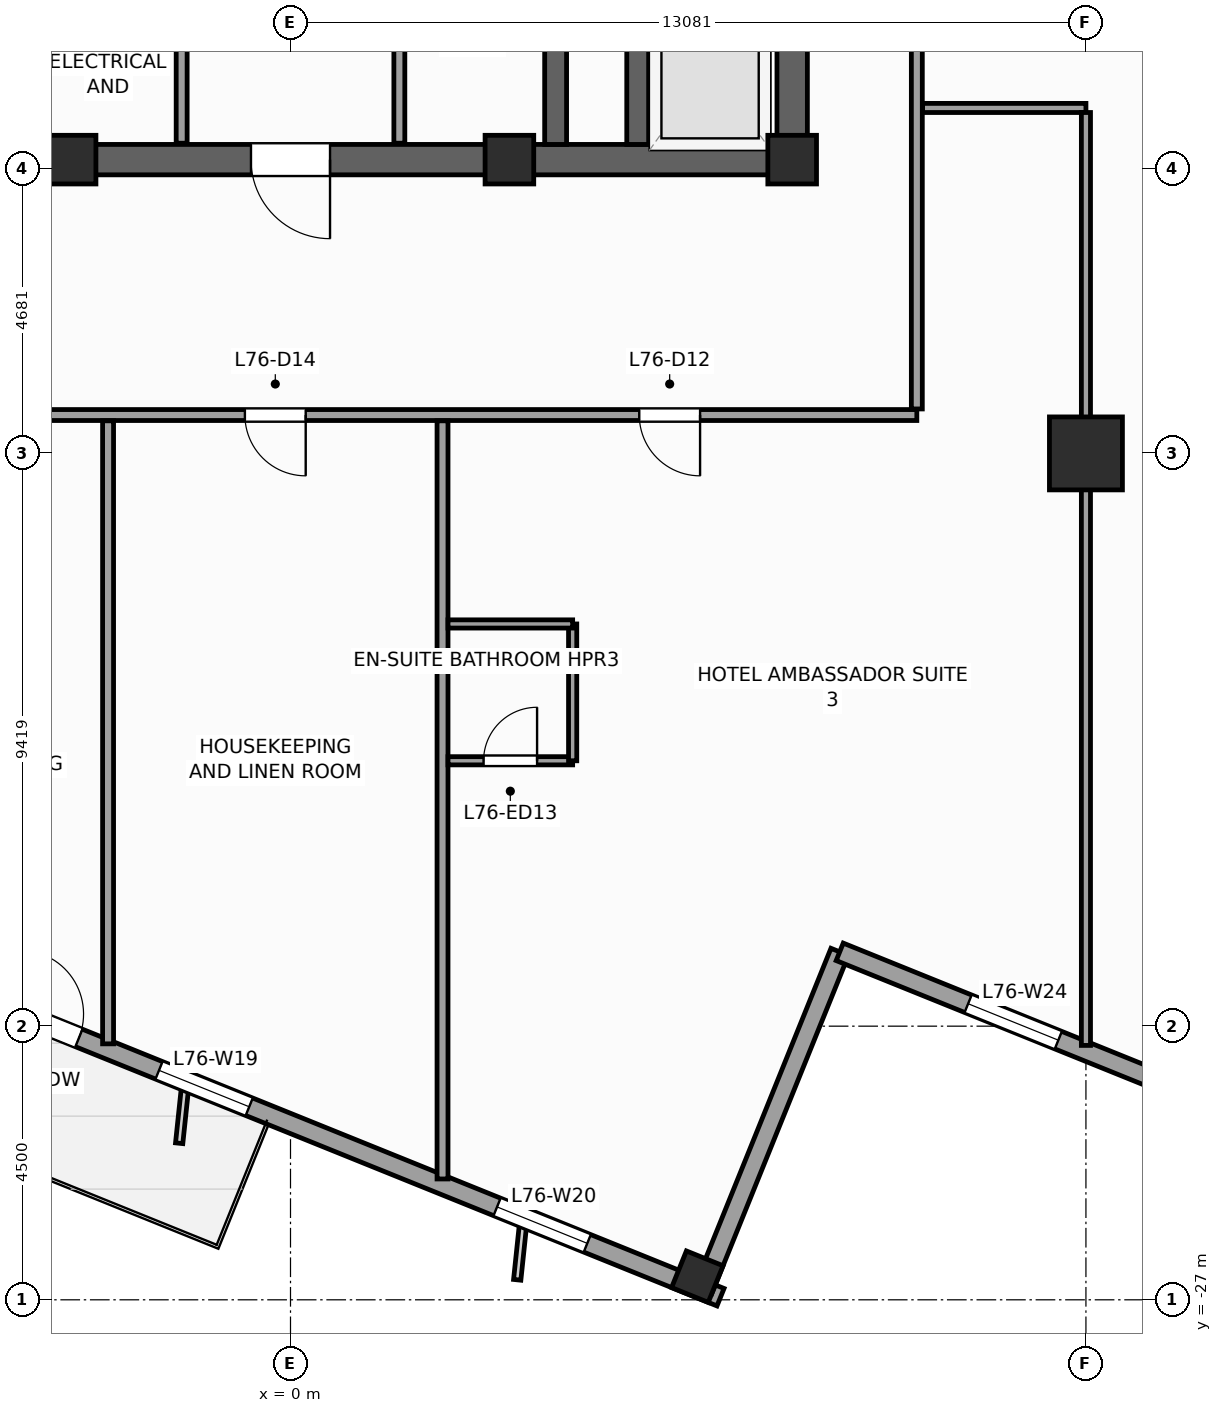
"""IFC4 building model, lengths in metres.
Left out: names, types, materials, properties, quantities, classifications, styles, units other than length and angle.
Written with IfcOpenShell. Run it as: python <this file> out.ifc"""

import sys

from ifc_helpers import new_model, si_unit, direction, frame, frame_2d, origin, origin_2d, place, context, subcontext, project, spatial, rectangle, extrude, source, transform, mapped, element, fill, save


model = new_model("IFC4")
c1 = context("Model", 3, precision=1e-05, world=origin(), true_north=direction((0.0, 1.0)))
c2 = subcontext(c1, "Body", "Model", "MODEL_VIEW")
j1 = project(units=[si_unit("LENGTHUNIT", "METRE"), si_unit("PLANEANGLEUNIT", "RADIAN")], contexts=[c1])
p1 = place(None, origin())
s1 = spatial("IfcSite", under=j1, at=p1, CompositionType="ELEMENT")
p2 = place(p1, origin())
s2 = spatial("IfcBuilding", under=s1, at=p2, CompositionType="ELEMENT")
p3 = place(p2, frame((0.0, 0.0, 308.4)))
s3 = spatial("IfcBuildingStorey", under=s2, at=p3, CompositionType="ELEMENT", Elevation=308.4)
p4 = place(p3, frame((-8.5, -8.25, 0.0), z_axis=(0.0, 0.0, 1.0), x_axis=(1.0, 0.0, 0.0)))
e1 = element("IfcWall", 1, at=p4, inside=s3, PredefinedType="SHEAR", context=c2, shape_type="SweptSolid", body=[
    extrude(rectangle(XDim=17.0, YDim=0.5, at=frame_2d((8.5, 0.0))), origin(), (0.0, 0.0, 1.0), 3.6),
])
p5 = place(p4, frame((7.85, 0.0, 0.0)))
e2 = element("IfcOpeningElement", 2, at=p5, cuts=e1, PredefinedType="OPENING", context=c2, shape_type="SweptSolid", body=[
    extrude(rectangle(XDim=1.3, YDim=2.2, at=frame_2d((0.65, 1.1))), frame((0.0, 0.26, 0.0), z_axis=(0.0, -1.0, 0.0), x_axis=(1.0, 0.0, 0.0)), (0.0, 0.0, 1.0), 0.52),
])
p6 = place(p3, frame((8.25, -8.0, 0.0), z_axis=(0.0, 0.0, 1.0), x_axis=(0.0, 1.0, 0.0)))
e3 = element("IfcWall", 3, at=p6, inside=s3, PredefinedType="SHEAR", context=c2, shape_type="SweptSolid", body=[
    extrude(rectangle(XDim=16.0, YDim=0.5, at=frame_2d((8.0, 0.0))), origin(), (0.0, 0.0, 1.0), 3.6),
])
p7 = place(p6, frame((4.69, 0.0, 0.0)))
e4 = element("IfcOpeningElement", 4, at=p7, cuts=e3, PredefinedType="OPENING", context=c2, shape_type="SweptSolid", body=[
    extrude(rectangle(XDim=1.3, YDim=2.2, at=frame_2d((0.65, 1.1))), frame((0.0, 0.26, 0.0), z_axis=(0.0, -1.0, 0.0), x_axis=(1.0, 0.0, 0.0)), (0.0, 0.0, 1.0), 0.52),
])
p8 = place(p3, frame((4.36, -8.0, 0.0), z_axis=(0.0, 0.0, 1.0), x_axis=(0.0, 1.0, 0.0)))
e5 = element("IfcWall", 5, at=p8, inside=s3, PredefinedType="SHEAR", context=c2, shape_type="SweptSolid", body=[
    extrude(rectangle(XDim=16.0, YDim=0.36, at=frame_2d((8.0, 0.0))), origin(), (0.0, 0.0, 1.0), 3.6),
])
p9 = place(p3, frame((5.71, -8.0, 0.0), z_axis=(0.0, 0.0, 1.0), x_axis=(0.0, 1.0, 0.0)))
e6 = element("IfcWall", 6, at=p9, inside=s3, PredefinedType="SHEAR", context=c2, shape_type="SweptSolid", body=[
    extrude(rectangle(XDim=2.54, YDim=0.36, at=frame_2d((1.27, 0.0))), origin(), (0.0, 0.0, 1.0), 3.6),
])
m1 = source(origin(), c2, "Body", "SweptSolid", [
    extrude(rectangle(XDim=0.8, YDim=0.8, at=origin_2d()), origin(), (0.0, 0.0, 1.0), 3.6),
])
for number, where, z_axis, x_axis in (
    (7, (8.25, -8.25, 0.0), (0.0, 0.0, 1.0), (1.0, 0.0, 0.0)),
    (8, (-3.6, -8.25, 0.0), (0.0, 0.0, 1.0), (1.0, 0.0, 0.0)),
    (9, (3.6, -8.25, 0.0), (0.0, 0.0, 1.0), (1.0, 0.0, 0.0)),
):
    element("IfcColumn", number, at=place(p3, frame(where, z_axis=z_axis, x_axis=x_axis)), inside=s3, PredefinedType="PILASTER", context=c2, shape_type="MappedRepresentation", body=[
        mapped(m1, transform((0.0, 0.0, 0.0), scale=1.0)),
    ])
m2 = source(origin(), c2, "Body", "SweptSolid", [
    extrude(rectangle(XDim=1.2, YDim=1.2, at=origin_2d()), origin(), (0.0, 0.0, 1.0), 3.6),
])
p10 = place(p3, frame((13.081, -13.081, 0.0), z_axis=(0.0, 0.0, 1.0), x_axis=(1.0, 0.0, 0.0)))
e10 = element("IfcColumn", 10, at=p10, inside=s3, PredefinedType="COLUMN", context=c2, shape_type="MappedRepresentation", body=[
    mapped(m2, transform((0.0, 0.0, 0.0), scale=1.0)),
])
m3 = source(origin(), c2, "Body", "SweptSolid", [
    extrude(rectangle(XDim=0.65, YDim=0.65, at=origin_2d()), origin(), (0.0, 0.0, 1.0), 3.6),
])
p11 = place(p3, frame((6.69, -26.62, 0.0), z_axis=(0.0, 0.0, 1.0), x_axis=(0.374606593416, 0.927183854567, 0.0)))
e11 = element("IfcColumn", 11, at=p11, inside=s3, PredefinedType="COLUMN", context=c2, shape_type="MappedRepresentation", body=[
    mapped(m3, transform((0.0, 0.0, 0.0), scale=1.0)),
])
p12 = place(p3, frame((-23.813, -14.479, 0.0), z_axis=(0.0, 0.0, 1.0), x_axis=(0.927182657188, -0.374609557019, 0.0)))
e12 = element("IfcWall", 12, at=p12, inside=s3, PredefinedType="STANDARD", context=c2, shape_type="SweptSolid", body=[
    extrude(rectangle(XDim=33.31, YDim=0.31, at=frame_2d((16.655, 0.0))), origin(), (0.0, 0.0, 1.0), 2.75),
])
p13 = place(p12, frame((20.88, 0.0, 0.0)))
e13 = element("IfcOpeningElement", 13, at=p13, cuts=e12, PredefinedType="OPENING", context=c2, shape_type="SweptSolid", body=[
    extrude(rectangle(XDim=1.05, YDim=2.25, at=frame_2d((0.525, 1.125))), frame((0.0, 0.165, 0.0), z_axis=(0.0, -1.0, 0.0), x_axis=(1.0, 0.0, 0.0)), (0.0, 0.0, 1.0), 0.33),
])
p14 = place(p12, frame((3.197, 0.0, 0.47)))
e14 = element("IfcOpeningElement", 14, at=p14, cuts=e12, PredefinedType="OPENING", context=c2, shape_type="SweptSolid", body=[
    extrude(rectangle(XDim=1.6, YDim=2.1, at=frame_2d((0.8, 1.05))), frame((0.0, 0.165, 0.0), z_axis=(0.0, -1.0, 0.0), x_axis=(1.0, 0.0, 0.0)), (0.0, 0.0, 1.0), 0.33),
])
p15 = place(p12, frame((8.86, 0.0, 0.47)))
e15 = element("IfcOpeningElement", 15, at=p15, cuts=e12, PredefinedType="OPENING", context=c2, shape_type="SweptSolid", body=[
    extrude(rectangle(XDim=1.6, YDim=2.1, at=frame_2d((0.8, 1.05))), frame((0.0, 0.165, 0.0), z_axis=(0.0, -1.0, 0.0), x_axis=(1.0, 0.0, 0.0)), (0.0, 0.0, 1.0), 0.33),
])
p16 = place(p12, frame((14.439, 0.0, 0.47)))
e16 = element("IfcOpeningElement", 16, at=p16, cuts=e12, PredefinedType="OPENING", context=c2, shape_type="SweptSolid", body=[
    extrude(rectangle(XDim=1.6, YDim=2.1, at=frame_2d((0.8, 1.05))), frame((0.0, 0.165, 0.0), z_axis=(0.0, -1.0, 0.0), x_axis=(1.0, 0.0, 0.0)), (0.0, 0.0, 1.0), 0.33),
])
p17 = place(p12, frame((23.351, 0.0, 0.47)))
e17 = element("IfcOpeningElement", 17, at=p17, cuts=e12, PredefinedType="OPENING", context=c2, shape_type="SweptSolid", body=[
    extrude(rectangle(XDim=1.6, YDim=2.1, at=frame_2d((0.8, 1.05))), frame((0.0, 0.165, 0.0), z_axis=(0.0, -1.0, 0.0), x_axis=(1.0, 0.0, 0.0)), (0.0, 0.0, 1.0), 0.33),
])
p18 = place(p12, frame((29.347, 0.0, 0.47)))
e18 = element("IfcOpeningElement", 18, at=p18, cuts=e12, PredefinedType="OPENING", context=c2, shape_type="SweptSolid", body=[
    extrude(rectangle(XDim=1.6, YDim=2.1, at=frame_2d((0.8, 1.05))), frame((0.0, 0.165, 0.0), z_axis=(0.0, -1.0, 0.0), x_axis=(1.0, 0.0, 0.0)), (0.0, 0.0, 1.0), 0.33),
])
p19 = place(p3, frame((6.784, -26.841, 0.0), z_axis=(0.0, 0.0, 1.0), x_axis=(0.374636620962, 0.927171722085, 0.0)))
e19 = element("IfcWall", 19, at=p19, inside=s3, PredefinedType="STANDARD", context=c2, shape_type="SweptSolid", body=[
    extrude(rectangle(XDim=6.0, YDim=0.31, at=frame_2d((3.0, 0.0))), origin(), (0.0, 0.0, 1.0), 2.65),
])
p20 = place(p3, frame((9.032, -21.278, 0.0), z_axis=(0.0, 0.0, 1.0), x_axis=(0.927185411764, -0.374602739196, 0.0)))
e20 = element("IfcWall", 20, at=p20, inside=s3, PredefinedType="STANDARD", context=c2, shape_type="SweptSolid", body=[
    extrude(rectangle(XDim=6.155, YDim=0.31, at=frame_2d((3.078, 0.0))), origin(), (0.0, 0.0, 1.0), 3.35),
])
p21 = place(p20, frame((2.278, 0.0, 0.47)))
e21 = element("IfcOpeningElement", 21, at=p21, cuts=e20, PredefinedType="OPENING", context=c2, shape_type="SweptSolid", body=[
    extrude(rectangle(XDim=1.6, YDim=2.1, at=frame_2d((0.8, 1.05))), frame((0.0, 0.165, 0.0), z_axis=(0.0, -1.0, 0.0), x_axis=(1.0, 0.0, 0.0)), (0.0, 0.0, 1.0), 0.33),
])
p22 = place(p3, frame((-1.79, -7.98, 0.0), z_axis=(0.0, 0.0, 1.0), x_axis=(0.0, 1.0, 0.0)))
e22 = element("IfcWall", 22, at=p22, inside=s3, PredefinedType="PARTITIONING", context=c2, shape_type="SweptSolid", body=[
    extrude(rectangle(XDim=12.38, YDim=0.18, at=frame_2d((6.19, 0.0))), origin(), (0.0, 0.0, 1.0), 3.35),
])
p23 = place(p22, frame((8.8, 0.0, 0.0)))
e23 = element("IfcOpeningElement", 23, at=p23, cuts=e22, PredefinedType="OPENING", context=c2, shape_type="SweptSolid", body=[
    extrude(rectangle(XDim=1.1, YDim=2.2, at=frame_2d((0.55, 1.1))), frame((0.0, 0.1, 0.0), z_axis=(0.0, -1.0, 0.0), x_axis=(1.0, 0.0, 0.0)), (0.0, 0.0, 1.0), 0.2),
])
p24 = place(p22, frame((10.86, 0.0, 0.0)))
e24 = element("IfcOpeningElement", 24, at=p24, cuts=e22, PredefinedType="OPENING", context=c2, shape_type="SweptSolid", body=[
    extrude(rectangle(XDim=1.1, YDim=2.2, at=frame_2d((0.55, 1.1))), frame((0.0, 0.1, 0.0), z_axis=(0.0, -1.0, 0.0), x_axis=(1.0, 0.0, 0.0)), (0.0, 0.0, 1.0), 0.2),
])
p25 = place(p22, frame((3.5, 0.0, 0.0)))
e25 = element("IfcOpeningElement", 25, at=p25, cuts=e22, PredefinedType="OPENING", context=c2, shape_type="SweptSolid", body=[
    extrude(rectangle(XDim=1.15, YDim=2.25, at=frame_2d((0.575, 1.125))), frame((0.0, 0.1, 0.0), z_axis=(0.0, -1.0, 0.0), x_axis=(1.0, 0.0, 0.0)), (0.0, 0.0, 1.0), 0.2),
])
p26 = place(p3, frame((1.79, -7.98, 0.0), z_axis=(0.0, 0.0, 1.0), x_axis=(0.0, 1.0, 0.0)))
e26 = element("IfcWall", 26, at=p26, inside=s3, PredefinedType="PARTITIONING", context=c2, shape_type="SweptSolid", body=[
    extrude(rectangle(XDim=12.38, YDim=0.18, at=frame_2d((6.19, 0.0))), origin(), (0.0, 0.0, 1.0), 3.35),
])
p27 = place(p26, frame((8.8, 0.0, 0.0)))
e27 = element("IfcOpeningElement", 27, at=p27, cuts=e26, PredefinedType="OPENING", context=c2, shape_type="SweptSolid", body=[
    extrude(rectangle(XDim=1.1, YDim=2.2, at=frame_2d((0.55, 1.1))), frame((0.0, 0.1, 0.0), z_axis=(0.0, -1.0, 0.0), x_axis=(1.0, 0.0, 0.0)), (0.0, 0.0, 1.0), 0.2),
])
p28 = place(p26, frame((10.86, 0.0, 0.0)))
e28 = element("IfcOpeningElement", 28, at=p28, cuts=e26, PredefinedType="OPENING", context=c2, shape_type="SweptSolid", body=[
    extrude(rectangle(XDim=1.1, YDim=2.2, at=frame_2d((0.55, 1.1))), frame((0.0, 0.1, 0.0), z_axis=(0.0, -1.0, 0.0), x_axis=(1.0, 0.0, 0.0)), (0.0, 0.0, 1.0), 0.2),
])
p29 = place(p26, frame((3.5, 0.0, 0.0)))
e29 = element("IfcOpeningElement", 29, at=p29, cuts=e26, PredefinedType="OPENING", context=c2, shape_type="SweptSolid", body=[
    extrude(rectangle(XDim=1.15, YDim=2.25, at=frame_2d((0.575, 1.125))), frame((0.0, 0.1, 0.0), z_axis=(0.0, -1.0, 0.0), x_axis=(1.0, 0.0, 0.0)), (0.0, 0.0, 1.0), 0.2),
])
p30 = place(p3, frame((-10.3, -12.45, 0.0), z_axis=(0.0, 0.0, 1.0), x_axis=(1.0, 0.0, 0.0)))
e30 = element("IfcWall", 30, at=p30, inside=s3, PredefinedType="PARTITIONING", context=c2, shape_type="SweptSolid", body=[
    extrude(rectangle(XDim=20.6, YDim=0.18, at=frame_2d((10.3, 0.0))), origin(), (0.0, 0.0, 1.0), 3.35),
])
p31 = place(p30, frame((1.605, 0.0, 0.0)))
e31 = element("IfcOpeningElement", 31, at=p31, cuts=e30, PredefinedType="OPENING", context=c2, shape_type="SweptSolid", body=[
    extrude(rectangle(XDim=0.95, YDim=2.1, at=frame_2d((0.475, 1.05))), frame((0.0, 0.1, 0.0), z_axis=(0.0, -1.0, 0.0), x_axis=(1.0, 0.0, 0.0)), (0.0, 0.0, 1.0), 0.2),
])
p32 = place(p30, frame((16.036, 0.0, 0.0)))
e32 = element("IfcOpeningElement", 32, at=p32, cuts=e30, PredefinedType="OPENING", context=c2, shape_type="SweptSolid", body=[
    extrude(rectangle(XDim=1.0, YDim=2.15, at=frame_2d((0.5, 1.075))), frame((0.0, 0.1, 0.0), z_axis=(0.0, -1.0, 0.0), x_axis=(1.0, 0.0, 0.0)), (0.0, 0.0, 1.0), 0.2),
])
p33 = place(p30, frame((9.55, 0.0, 0.0)))
e33 = element("IfcOpeningElement", 33, at=p33, cuts=e30, PredefinedType="OPENING", context=c2, shape_type="SweptSolid", body=[
    extrude(rectangle(XDim=1.0, YDim=2.15, at=frame_2d((0.5, 1.075))), frame((0.0, 0.1, 0.0), z_axis=(0.0, -1.0, 0.0), x_axis=(1.0, 0.0, 0.0)), (0.0, 0.0, 1.0), 0.2),
])
p34 = place(p3, frame((10.3, -12.35, 0.0), z_axis=(0.0, 0.0, 1.0), x_axis=(0.0, 1.0, 0.0)))
e34 = element("IfcWall", 34, at=p34, inside=s3, PredefinedType="PARTITIONING", context=c2, shape_type="SweptSolid", body=[
    extrude(rectangle(XDim=24.7, YDim=0.18, at=frame_2d((12.35, 0.0))), origin(), (0.0, 0.0, 1.0), 3.35),
])
p35 = place(p34, frame((21.561, 0.0, 0.0)))
e35 = element("IfcOpeningElement", 35, at=p35, cuts=e34, PredefinedType="OPENING", context=c2, shape_type="SweptSolid", body=[
    extrude(rectangle(XDim=1.0, YDim=2.15, at=frame_2d((0.5, 1.075))), frame((0.0, 0.1, 0.0), z_axis=(0.0, -1.0, 0.0), x_axis=(1.0, 0.0, 0.0)), (0.0, 0.0, 1.0), 0.2),
])
p36 = place(p34, frame((16.8, 0.0, 0.0)))
e36 = element("IfcOpeningElement", 36, at=p36, cuts=e34, PredefinedType="OPENING", context=c2, shape_type="SweptSolid", body=[
    extrude(rectangle(XDim=1.0, YDim=2.15, at=frame_2d((0.5, 1.075))), frame((0.0, 0.1, 0.0), z_axis=(0.0, -1.0, 0.0), x_axis=(1.0, 0.0, 0.0)), (0.0, 0.0, 1.0), 0.2),
])
p37 = place(p34, frame((11.85, 0.0, 0.0)))
e37 = element("IfcOpeningElement", 37, at=p37, cuts=e34, PredefinedType="OPENING", context=c2, shape_type="SweptSolid", body=[
    extrude(rectangle(XDim=1.0, YDim=2.15, at=frame_2d((0.5, 1.075))), frame((0.0, 0.1, 0.0), z_axis=(0.0, -1.0, 0.0), x_axis=(1.0, 0.0, 0.0)), (0.0, 0.0, 1.0), 0.2),
])
p38 = place(p34, frame((6.9, 0.0, 0.0)))
e38 = element("IfcOpeningElement", 38, at=p38, cuts=e34, PredefinedType="OPENING", context=c2, shape_type="SweptSolid", body=[
    extrude(rectangle(XDim=1.0, YDim=2.15, at=frame_2d((0.5, 1.075))), frame((0.0, 0.1, 0.0), z_axis=(0.0, -1.0, 0.0), x_axis=(1.0, 0.0, 0.0)), (0.0, 0.0, 1.0), 0.2),
])
p39 = place(p3, frame((2.5, -12.545, 0.0), z_axis=(0.0, 0.0, 1.0), x_axis=(0.0, -1.0, 0.0)))
e39 = element("IfcWall", 39, at=p39, inside=s3, PredefinedType="PARTITIONING", context=c2, shape_type="SweptSolid", body=[
    extrude(rectangle(XDim=12.468, YDim=0.18, at=frame_2d((6.234, 0.0))), origin(), (0.0, 0.0, 1.0), 3.35),
])
p40 = place(p3, frame((-3.0, -12.545, 0.0), z_axis=(0.0, 0.0, 1.0), x_axis=(0.0, -1.0, 0.0)))
e40 = element("IfcWall", 40, at=p40, inside=s3, PredefinedType="PARTITIONING", context=c2, shape_type="SweptSolid", body=[
    extrude(rectangle(XDim=10.246, YDim=0.18, at=frame_2d((5.123, 0.0))), origin(), (0.0, 0.0, 1.0), 3.35),
])
p41 = place(p3, frame((10.395, -7.4, 0.0), z_axis=(0.0, 0.0, 1.0), x_axis=(1.0, 0.0, 0.0)))
e41 = element("IfcWall", 41, at=p41, inside=s3, PredefinedType="PARTITIONING", context=c2, shape_type="SweptSolid", body=[
    extrude(rectangle(XDim=2.686, YDim=0.15, at=frame_2d((1.343, 0.0))), origin(), (0.0, 0.0, 1.0), 3.35),
])
p42 = place(p3, frame((13.081, -7.475, 0.0), z_axis=(0.0, 0.0, 1.0), x_axis=(0.0, -1.0, 0.0)))
e42 = element("IfcWall", 42, at=p42, inside=s3, PredefinedType="PARTITIONING", context=c2, shape_type="SweptSolid", body=[
    extrude(rectangle(XDim=15.342, YDim=0.15, at=frame_2d((7.671, 0.0))), origin(), (0.0, 0.0, 1.0), 2.45),
])
p43 = place(p3, frame((2.59, -18.136, 0.0), z_axis=(0.0, 0.0, 1.0), x_axis=(1.0, 0.0, 0.0)))
e43 = element("IfcWall", 43, at=p43, inside=s3, PredefinedType="PARTITIONING", context=c2, shape_type="SweptSolid", body=[
    extrude(rectangle(XDim=2.05, YDim=0.135, at=frame_2d((1.025, 0.0))), origin(), (0.0, 0.0, 1.0), 3.35),
])
p44 = place(p43, frame((0.585, 0.0, 0.0)))
e44 = element("IfcOpeningElement", 44, at=p44, cuts=e43, PredefinedType="OPENING", context=c2, shape_type="SweptSolid", body=[
    extrude(rectangle(XDim=0.88, YDim=2.1, at=frame_2d((0.44, 1.05))), frame((0.0, 0.078, 0.0), z_axis=(0.0, -1.0, 0.0), x_axis=(1.0, 0.0, 0.0)), (0.0, 0.0, 1.0), 0.155),
])
p45 = place(p3, frame((4.64, -18.136, 0.0), z_axis=(0.0, 0.0, 1.0), x_axis=(0.0, 1.0, 0.0)))
e45 = element("IfcWall", 45, at=p45, inside=s3, PredefinedType="PARTITIONING", context=c2, shape_type="SweptSolid", body=[
    extrude(rectangle(XDim=2.25, YDim=0.135, at=frame_2d((1.125, 0.0))), origin(), (0.0, 0.0, 1.0), 3.35),
])
p46 = place(p3, frame((2.59, -15.886, 0.0), z_axis=(0.0, 0.0, 1.0), x_axis=(1.0, 0.0, 0.0)))
e46 = element("IfcWall", 46, at=p46, inside=s3, PredefinedType="PARTITIONING", context=c2, shape_type="SweptSolid", body=[
    extrude(rectangle(XDim=2.05, YDim=0.135, at=frame_2d((1.025, 0.0))), origin(), (0.0, 0.0, 1.0), 3.35),
])
m4 = source(origin(), c2, "Body", "SweptSolid", [
    extrude(rectangle(XDim=1.05, YDim=2.25, at=frame_2d((0.525, 1.125))), frame((0.0, 0.025, 0.0), z_axis=(0.0, -1.0, 0.0), x_axis=(1.0, 0.0, 0.0)), (0.0, 0.0, 1.0), 0.05),
])
p47 = place(p13, origin())
e47 = element("IfcDoor", 47, at=p47, inside=s3, OperationType="SINGLE_SWING_LEFT", PredefinedType="DOOR", context=c2, shape_type="MappedRepresentation", body=[
    mapped(m4, transform((0.0, 0.0, 0.0), scale=1.0)),
])
fill(e13, e47)
m5 = source(origin(), c2, "Body", "SweptSolid", [
    extrude(rectangle(XDim=1.6, YDim=2.1, at=frame_2d((0.8, 1.05))), frame((0.0, 0.03, 0.0), z_axis=(0.0, -1.0, 0.0), x_axis=(1.0, 0.0, 0.0)), (0.0, 0.0, 1.0), 0.06),
])
p48 = place(p17, origin())
e48 = element("IfcWindow", 48, at=p48, inside=s3, PartitioningType="SINGLE_PANEL", PredefinedType="WINDOW", context=c2, shape_type="MappedRepresentation", body=[
    mapped(m5, transform((0.0, 0.0, 0.0), scale=1.0)),
])
fill(e17, e48)
p49 = place(p18, origin())
e49 = element("IfcWindow", 49, at=p49, inside=s3, PartitioningType="SINGLE_PANEL", PredefinedType="WINDOW", context=c2, shape_type="MappedRepresentation", body=[
    mapped(m5, transform((0.0, 0.0, 0.0), scale=1.0)),
])
fill(e18, e49)
p50 = place(p21, origin())
e50 = element("IfcWindow", 50, at=p50, inside=s3, PartitioningType="SINGLE_PANEL", PredefinedType="WINDOW", context=c2, shape_type="MappedRepresentation", body=[
    mapped(m5, transform((0.0, 0.0, 0.0), scale=1.0)),
])
fill(e21, e50)
m6 = source(origin(), c2, "Body", "SweptSolid", [
    extrude(rectangle(XDim=1.3, YDim=2.2, at=frame_2d((0.65, 1.1))), frame((0.0, 0.025, 0.0), z_axis=(0.0, -1.0, 0.0), x_axis=(1.0, 0.0, 0.0)), (0.0, 0.0, 1.0), 0.05),
])
p51 = place(p5, frame((1.3, 0.0, 0.0), z_axis=(0.0, 0.0, 1.0), x_axis=(-1.0, 0.0, 0.0)))
e51 = element("IfcDoor", 51, at=p51, inside=s3, OperationType="SINGLE_SWING_RIGHT", PredefinedType="DOOR", context=c2, shape_type="MappedRepresentation", body=[
    mapped(m6, transform((0.0, 0.0, 0.0), scale=1.0)),
])
fill(e2, e51)
m7 = source(origin(), c2, "Body", "SweptSolid", [
    extrude(rectangle(XDim=1.0, YDim=2.15, at=frame_2d((0.5, 1.075))), frame((0.0, 0.025, 0.0), z_axis=(0.0, -1.0, 0.0), x_axis=(1.0, 0.0, 0.0)), (0.0, 0.0, 1.0), 0.05),
])
p52 = place(p32, frame((1.0, 0.0, 0.0), z_axis=(0.0, 0.0, 1.0), x_axis=(-1.0, 0.0, 0.0)))
e52 = element("IfcDoor", 52, at=p52, inside=s3, OperationType="SINGLE_SWING_RIGHT", PredefinedType="DOOR", context=c2, shape_type="MappedRepresentation", body=[
    mapped(m7, transform((0.0, 0.0, 0.0), scale=1.0)),
])
fill(e32, e52)
m8 = source(origin(), c2, "Body", "SweptSolid", [
    extrude(rectangle(XDim=0.88, YDim=2.1, at=frame_2d((0.44, 1.05))), frame((0.0, 0.025, 0.0), z_axis=(0.0, -1.0, 0.0), x_axis=(1.0, 0.0, 0.0)), (0.0, 0.0, 1.0), 0.05),
])
p53 = place(p44, origin())
e53 = element("IfcDoor", 53, at=p53, inside=s3, OperationType="SINGLE_SWING_RIGHT", PredefinedType="DOOR", context=c2, shape_type="MappedRepresentation", body=[
    mapped(m8, transform((0.0, 0.0, 0.0), scale=1.0)),
])
fill(e44, e53)
p54 = place(p33, frame((1.0, 0.0, 0.0), z_axis=(0.0, 0.0, 1.0), x_axis=(-1.0, 0.0, 0.0)))
e54 = element("IfcDoor", 54, at=p54, inside=s3, OperationType="SINGLE_SWING_RIGHT", PredefinedType="DOOR", context=c2, shape_type="MappedRepresentation", body=[
    mapped(m7, transform((0.0, 0.0, 0.0), scale=1.0)),
])
fill(e33, e54)
save(model, sys.argv[1])
